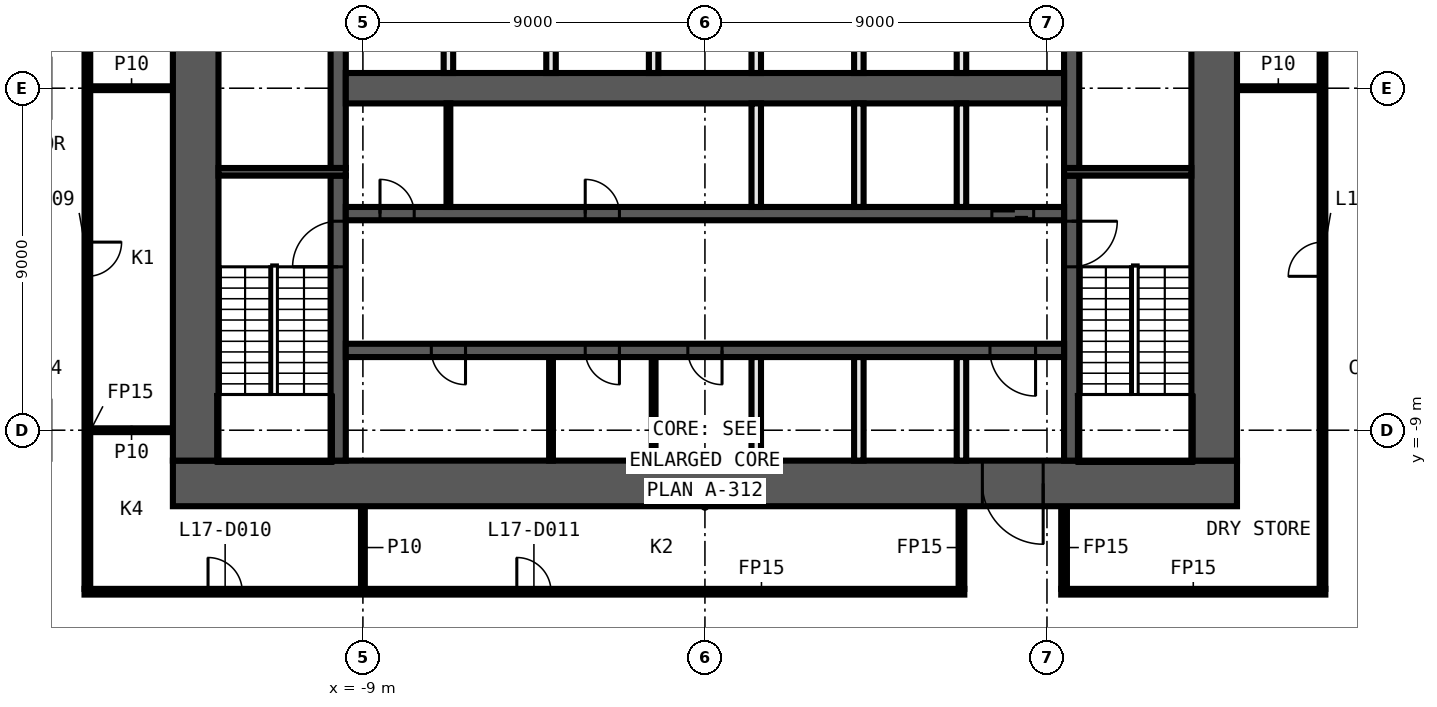
"""IFC4 building model, lengths in metres.
Left out: names, types, materials, properties, quantities, classifications, styles, units other than length and angle.
Written with IfcOpenShell. Run it as: python <this file> out.ifc"""

import sys

from ifc_helpers import new_model, si_unit, direction, frame, frame_2d, origin, place, context, subcontext, project, spatial, rectangle, extrude, element, fill, save


model = new_model("IFC4")
c1 = context("Model", 3, precision=1e-05, world=origin(), true_north=direction((0.0, 1.0)))
c2 = subcontext(c1, "Body", "Model", "MODEL_VIEW")
j1 = project(units=[si_unit("LENGTHUNIT", "METRE"), si_unit("PLANEANGLEUNIT", "RADIAN")], contexts=[c1])
p1 = place(None, origin())
s1 = spatial("IfcSite", under=j1, at=p1, CompositionType="ELEMENT")
p2 = place(p1, origin())
s2 = spatial("IfcBuilding", under=s1, at=p2, CompositionType="ELEMENT")
p3 = place(p2, frame((0.0, 0.0, 84.7)))
s3 = spatial("IfcBuildingStorey", under=s2, at=p3, CompositionType="ELEMENT", Elevation=84.7)
p4 = place(p3, frame((-16.325, -13.25, 0.0), z_axis=(0.0, 0.0, 1.0), x_axis=(1.0, 0.0, 0.0)))
e1 = element("IfcWall", 1, at=p4, inside=s3, PredefinedType="PARTITIONING", context=c2, shape_type="SweptSolid", body=[
    extrude(rectangle(XDim=23.15, YDim=0.15, at=frame_2d((11.575, 0.0))), origin(), (0.0, 0.0, 1.0), 3.9),
])
p5 = place(p4, frame((3.25, 0.0, 0.0)))
e2 = element("IfcOpeningElement", 2, at=p5, cuts=e1, PredefinedType="OPENING", context=c2, shape_type="SweptSolid", body=[
    extrude(rectangle(XDim=0.9, YDim=2.1, at=frame_2d((0.45, 1.05))), frame((0.0, 0.085, 0.0), z_axis=(0.0, -1.0, 0.0), x_axis=(1.0, 0.0, 0.0)), (0.0, 0.0, 1.0), 0.17),
])
p6 = place(p4, frame((11.375, 0.0, 0.0)))
e3 = element("IfcOpeningElement", 3, at=p6, cuts=e1, PredefinedType="OPENING", context=c2, shape_type="SweptSolid", body=[
    extrude(rectangle(XDim=0.9, YDim=2.1, at=frame_2d((0.45, 1.05))), frame((0.0, 0.085, 0.0), z_axis=(0.0, -1.0, 0.0), x_axis=(1.0, 0.0, 0.0)), (0.0, 0.0, 1.0), 0.17),
])
p7 = place(p3, frame((9.375, -13.25, 0.0), z_axis=(0.0, 0.0, 1.0), x_axis=(1.0, 0.0, 0.0)))
e4 = element("IfcWall", 4, at=p7, inside=s3, PredefinedType="PARTITIONING", context=c2, shape_type="SweptSolid", body=[
    extrude(rectangle(XDim=6.95, YDim=0.15, at=frame_2d((3.475, 0.0))), origin(), (0.0, 0.0, 1.0), 3.9),
])
for number, where, z_axis, x_axis in (
    (5, (-16.175, -9.0, 0.0), (0.0, 0.0, 1.0), (1.0, 0.0, 0.0)),
    (6, (-16.175, 0.0, 0.0), (0.0, 0.0, 1.0), (1.0, 0.0, 0.0)),
    (7, (14.0, 0.0, 0.0), (0.0, 0.0, 1.0), (1.0, 0.0, 0.0)),
):
    element("IfcWall", number, at=place(p3, frame(where, z_axis=z_axis, x_axis=x_axis)), inside=s3, PredefinedType="PARTITIONING", context=c2, shape_type="SweptSolid", body=[
        extrude(rectangle(XDim=2.175, YDim=0.1, at=frame_2d((1.087, 0.0))), origin(), (0.0, 0.0, 1.0), 3.9),
    ])
p8 = place(p3, frame((16.25, -13.175, 0.0), z_axis=(0.0, 0.0, 1.0), x_axis=(0.0, 1.0, 0.0)))
e8 = element("IfcWall", 8, at=p8, inside=s3, PredefinedType="PARTITIONING", context=c2, shape_type="SweptSolid", body=[
    extrude(rectangle(XDim=26.35, YDim=0.15, at=frame_2d((13.175, 0.0))), origin(), (0.0, 0.0, 1.0), 3.9),
])
p9 = place(p8, frame((8.225, 0.0, 0.0)))
e9 = element("IfcOpeningElement", 9, at=p9, cuts=e8, PredefinedType="OPENING", context=c2, shape_type="SweptSolid", body=[
    extrude(rectangle(XDim=0.9, YDim=2.1, at=frame_2d((0.45, 1.05))), frame((0.0, 0.085, 0.0), z_axis=(0.0, -1.0, 0.0), x_axis=(1.0, 0.0, 0.0)), (0.0, 0.0, 1.0), 0.17),
])
p10 = place(p8, frame((17.225, 0.0, 0.0)))
e10 = element("IfcOpeningElement", 10, at=p10, cuts=e8, PredefinedType="OPENING", context=c2, shape_type="SweptSolid", body=[
    extrude(rectangle(XDim=0.9, YDim=2.1, at=frame_2d((0.45, 1.05))), frame((0.0, 0.085, 0.0), z_axis=(0.0, -1.0, 0.0), x_axis=(1.0, 0.0, 0.0)), (0.0, 0.0, 1.0), 0.17),
])
for number, where, z_axis, x_axis in (
    (11, (9.45, -13.175, 0.0), (0.0, 0.0, 1.0), (0.0, 1.0, 0.0)),
    (12, (6.75, -13.175, 0.0), (0.0, 0.0, 1.0), (0.0, 1.0, 0.0)),
):
    element("IfcWall", number, at=place(p3, frame(where, z_axis=z_axis, x_axis=x_axis)), inside=s3, PredefinedType="PARTITIONING", context=c2, shape_type="SweptSolid", body=[
        extrude(rectangle(XDim=2.175, YDim=0.15, at=frame_2d((1.087, 0.0))), origin(), (0.0, 0.0, 1.0), 3.9),
    ])
p11 = place(p3, frame((-9.0, -13.175, 0.0), z_axis=(0.0, 0.0, 1.0), x_axis=(0.0, 1.0, 0.0)))
e13 = element("IfcWall", 13, at=p11, inside=s3, PredefinedType="PARTITIONING", context=c2, shape_type="SweptSolid", body=[
    extrude(rectangle(XDim=2.175, YDim=0.1, at=frame_2d((1.087, 0.0))), origin(), (0.0, 0.0, 1.0), 3.9),
])
p12 = place(p3, frame((-16.25, 13.175, 0.0), z_axis=(0.0, 0.0, 1.0), x_axis=(0.0, -1.0, 0.0)))
e14 = element("IfcWall", 14, at=p12, inside=s3, PredefinedType="PARTITIONING", context=c2, shape_type="SweptSolid", body=[
    extrude(rectangle(XDim=26.35, YDim=0.15, at=frame_2d((13.175, 0.0))), origin(), (0.0, 0.0, 1.0), 3.9),
])
p13 = place(p12, frame((17.225, 0.0, 0.0)))
e15 = element("IfcOpeningElement", 15, at=p13, cuts=e14, PredefinedType="OPENING", context=c2, shape_type="SweptSolid", body=[
    extrude(rectangle(XDim=0.9, YDim=2.1, at=frame_2d((0.45, 1.05))), frame((0.0, 0.085, 0.0), z_axis=(0.0, -1.0, 0.0), x_axis=(1.0, 0.0, 0.0)), (0.0, 0.0, 1.0), 0.17),
])
p14 = place(p12, frame((8.225, 0.0, 0.0)))
e16 = element("IfcOpeningElement", 16, at=p14, cuts=e14, PredefinedType="OPENING", context=c2, shape_type="SweptSolid", body=[
    extrude(rectangle(XDim=0.9, YDim=2.1, at=frame_2d((0.45, 1.05))), frame((0.0, 0.085, 0.0), z_axis=(0.0, -1.0, 0.0), x_axis=(1.0, 0.0, 0.0)), (0.0, 0.0, 1.0), 0.17),
])
p15 = place(p3, frame((14.0, -10.4, 0.0), z_axis=(0.0, 0.0, 1.0), x_axis=(-1.0, 0.0, 0.0)))
e17 = element("IfcWall", 17, at=p15, inside=s3, PredefinedType="SHEAR", context=c2, shape_type="SweptSolid", body=[
    extrude(rectangle(XDim=28.0, YDim=1.2, at=frame_2d((14.0, 0.0))), origin(), (0.0, 0.0, 1.0), 3.9),
])
p16 = place(p15, frame((5.1, 0.0, 0.0)))
e18 = element("IfcOpeningElement", 18, at=p16, cuts=e17, PredefinedType="OPENING", context=c2, shape_type="SweptSolid", body=[
    extrude(rectangle(XDim=1.6, YDim=2.1, at=frame_2d((0.8, 1.05))), frame((0.0, 0.61, 0.0), z_axis=(0.0, -1.0, 0.0), x_axis=(1.0, 0.0, 0.0)), (0.0, 0.0, 1.0), 1.22),
])
for number, where, z_axis, x_axis in (
    (19, (13.4, 9.8, 0.0), (0.0, 0.0, 1.0), (0.0, -1.0, 0.0)),
    (20, (-13.4, -9.8, 0.0), (0.0, 0.0, 1.0), (0.0, 1.0, 0.0)),
):
    element("IfcWall", number, at=place(p3, frame(where, z_axis=z_axis, x_axis=x_axis)), inside=s3, PredefinedType="SHEAR", context=c2, shape_type="SweptSolid", body=[
        extrude(rectangle(XDim=19.6, YDim=1.2, at=frame_2d((9.8, 0.0))), origin(), (0.0, 0.0, 1.0), 3.9),
    ])
p17 = place(p3, frame((9.65, -2.3, 0.0), z_axis=(0.0, 0.0, 1.0), x_axis=(0.0, -1.0, 0.0)))
e21 = element("IfcWall", 21, at=p17, inside=s3, PredefinedType="SHEAR", context=c2, shape_type="SweptSolid", body=[
    extrude(rectangle(XDim=7.5, YDim=0.4, at=frame_2d((3.75, 0.0))), origin(), (0.0, 0.0, 1.0), 3.9),
])
p18 = place(p17, frame((1.2, 0.0, 0.0)))
e22 = element("IfcOpeningElement", 22, at=p18, cuts=e21, PredefinedType="OPENING", context=c2, shape_type="SweptSolid", body=[
    extrude(rectangle(XDim=1.2, YDim=2.1, at=frame_2d((0.6, 1.05))), frame((0.0, 0.21, 0.0), z_axis=(0.0, -1.0, 0.0), x_axis=(1.0, 0.0, 0.0)), (0.0, 0.0, 1.0), 0.42),
])
p19 = place(p3, frame((9.65, 2.1, 0.0), z_axis=(0.0, 0.0, 1.0), x_axis=(0.0, -1.0, 0.0)))
e23 = element("IfcWall", 23, at=p19, inside=s3, PredefinedType="SHEAR", context=c2, shape_type="SweptSolid", body=[
    extrude(rectangle(XDim=4.2, YDim=0.4, at=frame_2d((2.1, 0.0))), origin(), (0.0, 0.0, 1.0), 3.9),
])
p20 = place(p19, frame((0.15, 0.0, 0.0)))
e24 = element("IfcOpeningElement", 24, at=p20, cuts=e23, PredefinedType="OPENING", context=c2, shape_type="SweptSolid", body=[
    extrude(rectangle(XDim=0.9, YDim=2.1, at=frame_2d((0.45, 1.05))), frame((0.0, 0.21, 0.0), z_axis=(0.0, -1.0, 0.0), x_axis=(1.0, 0.0, 0.0)), (0.0, 0.0, 1.0), 0.42),
])
p21 = place(p3, frame((-9.65, -9.8, 0.0), z_axis=(0.0, 0.0, 1.0), x_axis=(0.0, 1.0, 0.0)))
e25 = element("IfcWall", 25, at=p21, inside=s3, PredefinedType="SHEAR", context=c2, shape_type="SweptSolid", body=[
    extrude(rectangle(XDim=7.5, YDim=0.4, at=frame_2d((3.75, 0.0))), origin(), (0.0, 0.0, 1.0), 3.9),
])
p22 = place(p21, frame((5.1, 0.0, 0.0)))
e26 = element("IfcOpeningElement", 26, at=p22, cuts=e25, PredefinedType="OPENING", context=c2, shape_type="SweptSolid", body=[
    extrude(rectangle(XDim=1.2, YDim=2.1, at=frame_2d((0.6, 1.05))), frame((0.0, 0.21, 0.0), z_axis=(0.0, -1.0, 0.0), x_axis=(1.0, 0.0, 0.0)), (0.0, 0.0, 1.0), 0.42),
])
p23 = place(p3, frame((-9.65, -2.1, 0.0), z_axis=(0.0, 0.0, 1.0), x_axis=(0.0, 1.0, 0.0)))
e27 = element("IfcWall", 27, at=p23, inside=s3, PredefinedType="SHEAR", context=c2, shape_type="SweptSolid", body=[
    extrude(rectangle(XDim=4.2, YDim=0.4, at=frame_2d((2.1, 0.0))), origin(), (0.0, 0.0, 1.0), 3.9),
])
for number, where, z_axis, x_axis in (
    (28, (9.45, -2.2, 0.0), (0.0, 0.0, 1.0), (1.0, 0.0, 0.0)),
    (29, (-9.45, -2.2, 0.0), (0.0, 0.0, 1.0), (-1.0, 0.0, 0.0)),
):
    element("IfcWall", number, at=place(p3, frame(where, z_axis=z_axis, x_axis=x_axis)), inside=s3, PredefinedType="SHEAR", context=c2, shape_type="SweptSolid", body=[
        extrude(rectangle(XDim=3.35, YDim=0.2, at=frame_2d((1.675, 0.0))), origin(), (0.0, 0.0, 1.0), 3.9),
    ])
p24 = place(p3, frame((-9.45, -3.3, 0.0), z_axis=(0.0, 0.0, 1.0), x_axis=(1.0, 0.0, 0.0)))
e30 = element("IfcWall", 30, at=p24, inside=s3, PredefinedType="SHEAR", context=c2, shape_type="SweptSolid", body=[
    extrude(rectangle(XDim=18.9, YDim=0.35, at=frame_2d((9.45, 0.0))), origin(), (0.0, 0.0, 1.0), 3.9),
])
p25 = place(p24, frame((17.0, 0.0, 0.0)))
e31 = element("IfcOpeningElement", 31, at=p25, cuts=e30, PredefinedType="OPENING", context=c2, shape_type="SweptSolid", body=[
    extrude(rectangle(XDim=1.1, YDim=2.1, at=frame_2d((0.55, 1.05))), frame((0.0, 0.185, 0.0), z_axis=(0.0, -1.0, 0.0), x_axis=(1.0, 0.0, 0.0)), (0.0, 0.0, 1.0), 0.37),
])
p26 = place(p24, frame((0.9, 0.0, 0.0)))
e32 = element("IfcOpeningElement", 32, at=p26, cuts=e30, PredefinedType="OPENING", context=c2, shape_type="SweptSolid", body=[
    extrude(rectangle(XDim=0.9, YDim=2.1, at=frame_2d((0.45, 1.05))), frame((0.0, 0.185, 0.0), z_axis=(0.0, -1.0, 0.0), x_axis=(1.0, 0.0, 0.0)), (0.0, 0.0, 1.0), 0.37),
])
p27 = place(p24, frame((6.3, 0.0, 0.0)))
e33 = element("IfcOpeningElement", 33, at=p27, cuts=e30, PredefinedType="OPENING", context=c2, shape_type="SweptSolid", body=[
    extrude(rectangle(XDim=0.9, YDim=2.1, at=frame_2d((0.45, 1.05))), frame((0.0, 0.185, 0.0), z_axis=(0.0, -1.0, 0.0), x_axis=(1.0, 0.0, 0.0)), (0.0, 0.0, 1.0), 0.37),
])
p28 = place(p3, frame((9.45, -6.9, 0.0), z_axis=(0.0, 0.0, 1.0), x_axis=(-1.0, 0.0, 0.0)))
e34 = element("IfcWall", 34, at=p28, inside=s3, PredefinedType="SHEAR", context=c2, shape_type="SweptSolid", body=[
    extrude(rectangle(XDim=18.9, YDim=0.35, at=frame_2d((9.45, 0.0))), origin(), (0.0, 0.0, 1.0), 3.9),
])
p29 = place(p28, frame((0.75, 0.0, 0.0)))
e35 = element("IfcOpeningElement", 35, at=p29, cuts=e34, PredefinedType="OPENING", context=c2, shape_type="SweptSolid", body=[
    extrude(rectangle(XDim=1.2, YDim=2.1, at=frame_2d((0.6, 1.05))), frame((0.0, 0.185, 0.0), z_axis=(0.0, -1.0, 0.0), x_axis=(1.0, 0.0, 0.0)), (0.0, 0.0, 1.0), 0.37),
])
p30 = place(p28, frame((15.75, 0.0, 0.0)))
e36 = element("IfcOpeningElement", 36, at=p30, cuts=e34, PredefinedType="OPENING", context=c2, shape_type="SweptSolid", body=[
    extrude(rectangle(XDim=0.9, YDim=2.1, at=frame_2d((0.45, 1.05))), frame((0.0, 0.185, 0.0), z_axis=(0.0, -1.0, 0.0), x_axis=(1.0, 0.0, 0.0)), (0.0, 0.0, 1.0), 0.37),
])
p31 = place(p28, frame((11.7, 0.0, 0.0)))
e37 = element("IfcOpeningElement", 37, at=p31, cuts=e34, PredefinedType="OPENING", context=c2, shape_type="SweptSolid", body=[
    extrude(rectangle(XDim=0.9, YDim=2.1, at=frame_2d((0.45, 1.05))), frame((0.0, 0.185, 0.0), z_axis=(0.0, -1.0, 0.0), x_axis=(1.0, 0.0, 0.0)), (0.0, 0.0, 1.0), 0.37),
])
p32 = place(p28, frame((9.0, 0.0, 0.0)))
e38 = element("IfcOpeningElement", 38, at=p32, cuts=e34, PredefinedType="OPENING", context=c2, shape_type="SweptSolid", body=[
    extrude(rectangle(XDim=0.9, YDim=2.1, at=frame_2d((0.45, 1.05))), frame((0.0, 0.185, 0.0), z_axis=(0.0, -1.0, 0.0), x_axis=(1.0, 0.0, 0.0)), (0.0, 0.0, 1.0), 0.37),
])
p33 = place(p3, frame((-9.45, 0.0, 0.0), z_axis=(0.0, 0.0, 1.0), x_axis=(1.0, 0.0, 0.0)))
e39 = element("IfcWall", 39, at=p33, inside=s3, PredefinedType="SHEAR", context=c2, shape_type="SweptSolid", body=[
    extrude(rectangle(XDim=18.9, YDim=0.8, at=frame_2d((9.45, 0.0))), origin(), (0.0, 0.0, 1.0), 3.9),
])
for number, where, z_axis, x_axis in (
    (40, (6.75, -9.8, 0.0), (0.0, 0.0, 1.0), (0.0, 1.0, 0.0)),
    (41, (6.75, -3.125, 0.0), (0.0, 0.0, 1.0), (0.0, 1.0, 0.0)),
    (42, (6.75, 0.4, 0.0), (0.0, 0.0, 1.0), (0.0, 1.0, 0.0)),
    (43, (4.05, -9.8, 0.0), (0.0, 0.0, 1.0), (0.0, 1.0, 0.0)),
    (44, (4.05, -3.125, 0.0), (0.0, 0.0, 1.0), (0.0, 1.0, 0.0)),
    (45, (4.05, 0.4, 0.0), (0.0, 0.0, 1.0), (0.0, 1.0, 0.0)),
    (46, (1.35, -9.8, 0.0), (0.0, 0.0, 1.0), (0.0, 1.0, 0.0)),
    (47, (1.35, -3.125, 0.0), (0.0, 0.0, 1.0), (0.0, 1.0, 0.0)),
    (48, (1.35, 0.4, 0.0), (0.0, 0.0, 1.0), (0.0, 1.0, 0.0)),
):
    element("IfcWall", number, at=place(p3, frame(where, z_axis=z_axis, x_axis=x_axis)), inside=s3, PredefinedType="SOLIDWALL", context=c2, shape_type="SweptSolid", body=[
        extrude(rectangle(XDim=2.725, YDim=0.25, at=frame_2d((1.363, 0.0))), origin(), (0.0, 0.0, 1.0), 3.9),
    ])
p34 = place(p3, frame((-1.35, -9.8, 0.0), z_axis=(0.0, 0.0, 1.0), x_axis=(0.0, 1.0, 0.0)))
e49 = element("IfcWall", 49, at=p34, inside=s3, PredefinedType="PARTITIONING", context=c2, shape_type="SweptSolid", body=[
    extrude(rectangle(XDim=2.725, YDim=0.1, at=frame_2d((1.363, 0.0))), origin(), (0.0, 0.0, 1.0), 3.9),
])
p35 = place(p3, frame((-1.35, 0.4, 0.0), z_axis=(0.0, 0.0, 1.0), x_axis=(0.0, 1.0, 0.0)))
e50 = element("IfcWall", 50, at=p35, inside=s3, PredefinedType="SOLIDWALL", context=c2, shape_type="SweptSolid", body=[
    extrude(rectangle(XDim=2.725, YDim=0.25, at=frame_2d((1.363, 0.0))), origin(), (0.0, 0.0, 1.0), 3.9),
])
p36 = place(p3, frame((-4.05, -9.8, 0.0), z_axis=(0.0, 0.0, 1.0), x_axis=(0.0, 1.0, 0.0)))
e51 = element("IfcWall", 51, at=p36, inside=s3, PredefinedType="PARTITIONING", context=c2, shape_type="SweptSolid", body=[
    extrude(rectangle(XDim=2.725, YDim=0.1, at=frame_2d((1.363, 0.0))), origin(), (0.0, 0.0, 1.0), 3.9),
])
p37 = place(p3, frame((-4.05, 0.4, 0.0), z_axis=(0.0, 0.0, 1.0), x_axis=(0.0, 1.0, 0.0)))
e52 = element("IfcWall", 52, at=p37, inside=s3, PredefinedType="SOLIDWALL", context=c2, shape_type="SweptSolid", body=[
    extrude(rectangle(XDim=2.725, YDim=0.25, at=frame_2d((1.363, 0.0))), origin(), (0.0, 0.0, 1.0), 3.9),
])
p38 = place(p3, frame((-6.75, -3.125, 0.0), z_axis=(0.0, 0.0, 1.0), x_axis=(0.0, 1.0, 0.0)))
e53 = element("IfcWall", 53, at=p38, inside=s3, PredefinedType="PARTITIONING", context=c2, shape_type="SweptSolid", body=[
    extrude(rectangle(XDim=2.725, YDim=0.1, at=frame_2d((1.363, 0.0))), origin(), (0.0, 0.0, 1.0), 3.9),
])
p39 = place(p3, frame((-6.75, 0.4, 0.0), z_axis=(0.0, 0.0, 1.0), x_axis=(0.0, 1.0, 0.0)))
e54 = element("IfcWall", 54, at=p39, inside=s3, PredefinedType="SOLIDWALL", context=c2, shape_type="SweptSolid", body=[
    extrude(rectangle(XDim=2.725, YDim=0.25, at=frame_2d((1.363, 0.0))), origin(), (0.0, 0.0, 1.0), 3.9),
])
p40 = place(p13, origin())
e55 = element("IfcDoor", 55, at=p40, inside=s3, OperationType="SINGLE_SWING_LEFT", PredefinedType="DOOR", context=c2, shape_type="SweptSolid", body=[
    extrude(rectangle(XDim=0.9, YDim=2.1, at=frame_2d((0.45, 1.05))), frame((0.0, 0.025, 0.0), z_axis=(0.0, -1.0, 0.0), x_axis=(1.0, 0.0, 0.0)), (0.0, 0.0, 1.0), 0.05),
])
fill(e15, e55)
p41 = place(p5, origin())
e56 = element("IfcDoor", 56, at=p41, inside=s3, OperationType="SINGLE_SWING_RIGHT", PredefinedType="DOOR", context=c2, shape_type="SweptSolid", body=[
    extrude(rectangle(XDim=0.9, YDim=2.1, at=frame_2d((0.45, 1.05))), frame((0.0, 0.025, 0.0), z_axis=(0.0, -1.0, 0.0), x_axis=(1.0, 0.0, 0.0)), (0.0, 0.0, 1.0), 0.05),
])
fill(e2, e56)
p42 = place(p6, origin())
e57 = element("IfcDoor", 57, at=p42, inside=s3, OperationType="SINGLE_SWING_LEFT", PredefinedType="DOOR", context=c2, shape_type="SweptSolid", body=[
    extrude(rectangle(XDim=0.9, YDim=2.1, at=frame_2d((0.45, 1.05))), frame((0.0, 0.025, 0.0), z_axis=(0.0, -1.0, 0.0), x_axis=(1.0, 0.0, 0.0)), (0.0, 0.0, 1.0), 0.05),
])
fill(e3, e57)
p43 = place(p9, origin())
e58 = element("IfcDoor", 58, at=p43, inside=s3, OperationType="SINGLE_SWING_RIGHT", PredefinedType="DOOR", context=c2, shape_type="SweptSolid", body=[
    extrude(rectangle(XDim=0.9, YDim=2.1, at=frame_2d((0.45, 1.05))), frame((0.0, 0.025, 0.0), z_axis=(0.0, -1.0, 0.0), x_axis=(1.0, 0.0, 0.0)), (0.0, 0.0, 1.0), 0.05),
])
fill(e9, e58)
p44 = place(p25, origin())
e59 = element("IfcDoor", 59, at=p44, inside=s3, OperationType="DOUBLE_DOOR_SLIDING", PredefinedType="DOOR", context=c2, shape_type="SweptSolid", body=[
    extrude(rectangle(XDim=1.1, YDim=2.1, at=frame_2d((0.55, 1.05))), frame((0.0, 0.025, 0.0), z_axis=(0.0, -1.0, 0.0), x_axis=(1.0, 0.0, 0.0)), (0.0, 0.0, 1.0), 0.05),
])
fill(e31, e59)
p45 = place(p16, origin())
e60 = element("IfcDoor", 60, at=p45, inside=s3, OperationType="DOUBLE_DOOR_SINGLE_SWING", PredefinedType="DOOR", context=c2, shape_type="SweptSolid", body=[
    extrude(rectangle(XDim=1.6, YDim=2.1, at=frame_2d((0.8, 1.05))), frame((0.0, 0.025, 0.0), z_axis=(0.0, -1.0, 0.0), x_axis=(1.0, 0.0, 0.0)), (0.0, 0.0, 1.0), 0.05),
])
fill(e18, e60)
p46 = place(p29, origin())
e61 = element("IfcDoor", 61, at=p46, inside=s3, OperationType="SINGLE_SWING_LEFT", PredefinedType="DOOR", context=c2, shape_type="SweptSolid", body=[
    extrude(rectangle(XDim=1.2, YDim=2.1, at=frame_2d((0.6, 1.05))), frame((0.0, 0.025, 0.0), z_axis=(0.0, -1.0, 0.0), x_axis=(1.0, 0.0, 0.0)), (0.0, 0.0, 1.0), 0.05),
])
fill(e35, e61)
p47 = place(p26, origin())
e62 = element("IfcDoor", 62, at=p47, inside=s3, OperationType="SINGLE_SWING_RIGHT", PredefinedType="DOOR", context=c2, shape_type="SweptSolid", body=[
    extrude(rectangle(XDim=0.9, YDim=2.1, at=frame_2d((0.45, 1.05))), frame((0.0, 0.025, 0.0), z_axis=(0.0, -1.0, 0.0), x_axis=(1.0, 0.0, 0.0)), (0.0, 0.0, 1.0), 0.05),
])
fill(e32, e62)
p48 = place(p27, origin())
e63 = element("IfcDoor", 63, at=p48, inside=s3, OperationType="SINGLE_SWING_LEFT", PredefinedType="DOOR", context=c2, shape_type="SweptSolid", body=[
    extrude(rectangle(XDim=0.9, YDim=2.1, at=frame_2d((0.45, 1.05))), frame((0.0, 0.025, 0.0), z_axis=(0.0, -1.0, 0.0), x_axis=(1.0, 0.0, 0.0)), (0.0, 0.0, 1.0), 0.05),
])
fill(e33, e63)
p49 = place(p30, origin())
e64 = element("IfcDoor", 64, at=p49, inside=s3, OperationType="SINGLE_SWING_RIGHT", PredefinedType="DOOR", context=c2, shape_type="SweptSolid", body=[
    extrude(rectangle(XDim=0.9, YDim=2.1, at=frame_2d((0.45, 1.05))), frame((0.0, 0.025, 0.0), z_axis=(0.0, -1.0, 0.0), x_axis=(1.0, 0.0, 0.0)), (0.0, 0.0, 1.0), 0.05),
])
fill(e36, e64)
p50 = place(p31, origin())
e65 = element("IfcDoor", 65, at=p50, inside=s3, OperationType="SINGLE_SWING_LEFT", PredefinedType="DOOR", context=c2, shape_type="SweptSolid", body=[
    extrude(rectangle(XDim=0.9, YDim=2.1, at=frame_2d((0.45, 1.05))), frame((0.0, 0.025, 0.0), z_axis=(0.0, -1.0, 0.0), x_axis=(1.0, 0.0, 0.0)), (0.0, 0.0, 1.0), 0.05),
])
fill(e37, e65)
p51 = place(p32, origin())
e66 = element("IfcDoor", 66, at=p51, inside=s3, OperationType="SINGLE_SWING_RIGHT", PredefinedType="DOOR", context=c2, shape_type="SweptSolid", body=[
    extrude(rectangle(XDim=0.9, YDim=2.1, at=frame_2d((0.45, 1.05))), frame((0.0, 0.025, 0.0), z_axis=(0.0, -1.0, 0.0), x_axis=(1.0, 0.0, 0.0)), (0.0, 0.0, 1.0), 0.05),
])
fill(e38, e66)
p52 = place(p18, origin())
e67 = element("IfcDoor", 67, at=p52, inside=s3, OperationType="SINGLE_SWING_RIGHT", PredefinedType="DOOR", context=c2, shape_type="SweptSolid", body=[
    extrude(rectangle(XDim=1.2, YDim=2.1, at=frame_2d((0.6, 1.05))), frame((0.0, 0.025, 0.0), z_axis=(0.0, -1.0, 0.0), x_axis=(1.0, 0.0, 0.0)), (0.0, 0.0, 1.0), 0.05),
])
fill(e22, e67)
p53 = place(p22, origin())
e68 = element("IfcDoor", 68, at=p53, inside=s3, OperationType="SINGLE_SWING_LEFT", PredefinedType="DOOR", context=c2, shape_type="SweptSolid", body=[
    extrude(rectangle(XDim=1.2, YDim=2.1, at=frame_2d((0.6, 1.05))), frame((0.0, 0.025, 0.0), z_axis=(0.0, -1.0, 0.0), x_axis=(1.0, 0.0, 0.0)), (0.0, 0.0, 1.0), 0.05),
])
fill(e26, e68)
save(model, sys.argv[1])
